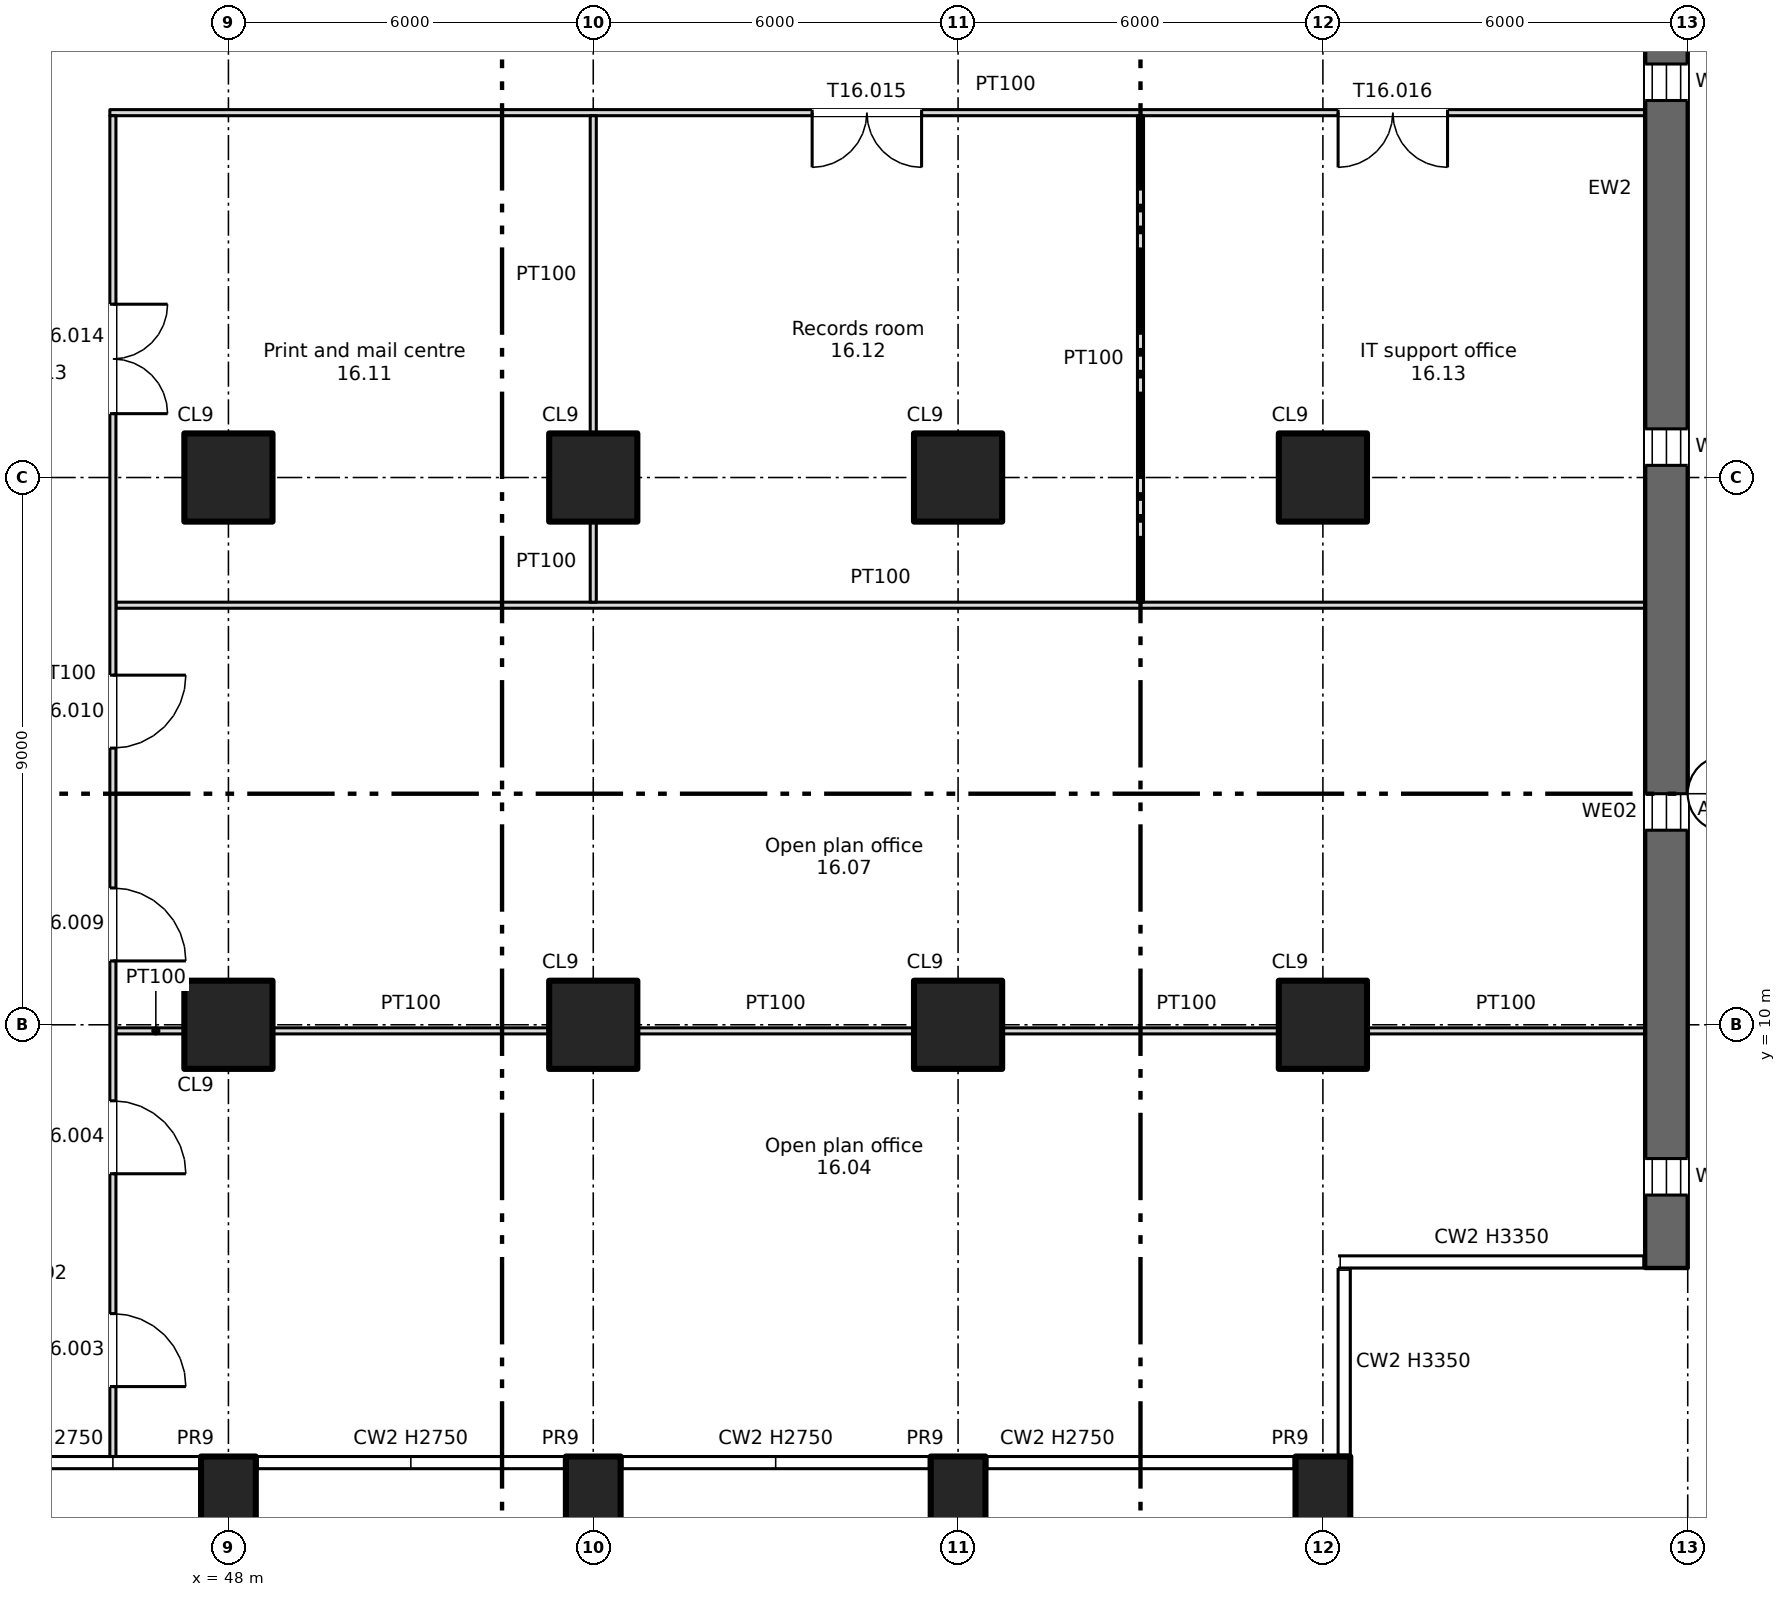
"""IFC4 building model, lengths in metres.
Left out: names, types, materials, properties, quantities, classifications, styles, units other than length and angle.
Written with IfcOpenShell. Run it as: python <this file> out.ifc"""

import sys

from ifc_helpers import new_model, si_unit, direction, frame, frame_2d, origin, origin_2d, place, context, subcontext, project, spatial, rectangle, extrude, element, fill, save


model = new_model("IFC4")
c1 = context("Model", 3, precision=1e-05, world=origin(), true_north=direction((0.0, 1.0)))
c2 = subcontext(c1, "Body", "Model", "MODEL_VIEW")
j1 = project(units=[si_unit("LENGTHUNIT", "METRE"), si_unit("PLANEANGLEUNIT", "RADIAN")], contexts=[c1])
p1 = place(None, origin())
s1 = spatial("IfcSite", under=j1, at=p1, CompositionType="ELEMENT")
p2 = place(p1, origin())
s2 = spatial("IfcBuilding", under=s1, at=p2, CompositionType="ELEMENT")
p3 = place(p2, frame((0.0, 0.0, 98.75)))
s3 = spatial("IfcBuildingStorey", under=s2, at=p3, CompositionType="ELEMENT", Elevation=98.75)
for number, where, z_axis, x_axis in (
    (1, (48.0, 2.2, -0.4), (0.0, 0.0, 1.0), (1.0, 0.0, 0.0)),
    (2, (54.0, 2.2, -0.4), (0.0, 0.0, 1.0), (1.0, 0.0, 0.0)),
    (3, (60.0, 2.2, -0.4), (0.0, 0.0, 1.0), (1.0, 0.0, 0.0)),
    (4, (66.0, 2.2, -0.4), (0.0, 0.0, 1.0), (1.0, 0.0, 0.0)),
):
    element("IfcColumn", number, at=place(p3, frame(where, z_axis=z_axis, x_axis=x_axis)), inside=s3, PredefinedType="COLUMN", context=c2, shape_type="SweptSolid", body=[
        extrude(rectangle(XDim=0.9, YDim=1.4, at=origin_2d()), origin(), (0.0, 0.0, 1.0), 3.75),
    ])
for number, where, z_axis, x_axis in (
    (5, (48.0, 10.0, 0.0), (0.0, 0.0, 1.0), (1.0, 0.0, 0.0)),
    (6, (48.0, 19.0, 0.0), (0.0, 0.0, 1.0), (1.0, 0.0, 0.0)),
    (7, (54.0, 10.0, 0.0), (0.0, 0.0, 1.0), (1.0, 0.0, 0.0)),
    (8, (54.0, 19.0, 0.0), (0.0, 0.0, 1.0), (1.0, 0.0, 0.0)),
    (9, (60.0, 10.0, 0.0), (0.0, 0.0, 1.0), (1.0, 0.0, 0.0)),
    (10, (60.0, 19.0, 0.0), (0.0, 0.0, 1.0), (1.0, 0.0, 0.0)),
    (11, (66.0, 10.0, 0.0), (0.0, 0.0, 1.0), (1.0, 0.0, 0.0)),
    (12, (66.0, 19.0, 0.0), (0.0, 0.0, 1.0), (1.0, 0.0, 0.0)),
):
    element("IfcColumn", number, at=place(p3, frame(where, z_axis=z_axis, x_axis=x_axis)), inside=s3, PredefinedType="COLUMN", context=c2, shape_type="SweptSolid", body=[
        extrude(rectangle(XDim=1.45, YDim=1.45, at=origin_2d()), origin(), (0.0, 0.0, 1.0), 3.35),
    ])
p4 = place(p3, frame((71.65, 6.0, 0.0), z_axis=(0.0, 0.0, 1.0), x_axis=(0.0, 1.0, 0.0)))
e13 = element("IfcWall", 13, at=p4, inside=s3, PredefinedType="SHEAR", context=c2, shape_type="SweptSolid", body=[
    extrude(rectangle(XDim=35.5, YDim=0.7, at=frame_2d((17.75, 0.0))), origin(), (0.0, 0.0, 1.0), 3.35),
])
p5 = place(p4, frame((1.2, 0.0, 0.6)))
e14 = element("IfcOpeningElement", 14, at=p5, cuts=e13, PredefinedType="OPENING", context=c2, shape_type="SweptSolid", body=[
    extrude(rectangle(XDim=0.6, YDim=2.4, at=frame_2d((0.3, 1.2))), frame((0.0, 0.36, 0.0), z_axis=(0.0, -1.0, 0.0), x_axis=(1.0, 0.0, 0.0)), (0.0, 0.0, 1.0), 0.72),
])
p6 = place(p4, frame((7.2, 0.0, 0.6)))
e15 = element("IfcOpeningElement", 15, at=p6, cuts=e13, PredefinedType="OPENING", context=c2, shape_type="SweptSolid", body=[
    extrude(rectangle(XDim=0.6, YDim=2.4, at=frame_2d((0.3, 1.2))), frame((0.0, 0.36, 0.0), z_axis=(0.0, -1.0, 0.0), x_axis=(1.0, 0.0, 0.0)), (0.0, 0.0, 1.0), 0.72),
])
p7 = place(p4, frame((13.2, 0.0, 0.6)))
e16 = element("IfcOpeningElement", 16, at=p7, cuts=e13, PredefinedType="OPENING", context=c2, shape_type="SweptSolid", body=[
    extrude(rectangle(XDim=0.6, YDim=2.4, at=frame_2d((0.3, 1.2))), frame((0.0, 0.36, 0.0), z_axis=(0.0, -1.0, 0.0), x_axis=(1.0, 0.0, 0.0)), (0.0, 0.0, 1.0), 0.72),
])
p8 = place(p4, frame((19.2, 0.0, 0.6)))
e17 = element("IfcOpeningElement", 17, at=p8, cuts=e13, PredefinedType="OPENING", context=c2, shape_type="SweptSolid", body=[
    extrude(rectangle(XDim=0.6, YDim=2.4, at=frame_2d((0.3, 1.2))), frame((0.0, 0.36, 0.0), z_axis=(0.0, -1.0, 0.0), x_axis=(1.0, 0.0, 0.0)), (0.0, 0.0, 1.0), 0.72),
])
p9 = place(p4, frame((25.2, 0.0, 0.6)))
e18 = element("IfcOpeningElement", 18, at=p9, cuts=e13, PredefinedType="OPENING", context=c2, shape_type="SweptSolid", body=[
    extrude(rectangle(XDim=0.6, YDim=2.4, at=frame_2d((0.3, 1.2))), frame((0.0, 0.36, 0.0), z_axis=(0.0, -1.0, 0.0), x_axis=(1.0, 0.0, 0.0)), (0.0, 0.0, 1.0), 0.72),
])
p10 = place(p4, frame((31.2, 0.0, 0.6)))
e19 = element("IfcOpeningElement", 19, at=p10, cuts=e13, PredefinedType="OPENING", context=c2, shape_type="SweptSolid", body=[
    extrude(rectangle(XDim=0.6, YDim=2.4, at=frame_2d((0.3, 1.2))), frame((0.0, 0.36, 0.0), z_axis=(0.0, -1.0, 0.0), x_axis=(1.0, 0.0, 0.0)), (0.0, 0.0, 1.0), 0.72),
])
p11 = place(p3, frame((66.725, 9.9, 0.0), z_axis=(0.0, 0.0, 1.0), x_axis=(1.0, 0.0, 0.0)))
e20 = element("IfcWall", 20, at=p11, inside=s3, PredefinedType="PARTITIONING", context=c2, shape_type="SweptSolid", body=[
    extrude(rectangle(XDim=4.575, YDim=0.1, at=frame_2d((2.288, 0.0))), origin(), (0.0, 0.0, 1.0), 3.35),
])
for number, where, z_axis, x_axis in (
    (21, (60.725, 9.9, 0.0), (0.0, 0.0, 1.0), (1.0, 0.0, 0.0)),
    (22, (54.725, 9.9, 0.0), (0.0, 0.0, 1.0), (1.0, 0.0, 0.0)),
    (23, (48.725, 9.9, 0.0), (0.0, 0.0, 1.0), (1.0, 0.0, 0.0)),
):
    element("IfcWall", number, at=place(p3, frame(where, z_axis=z_axis, x_axis=x_axis)), inside=s3, PredefinedType="PARTITIONING", context=c2, shape_type="SweptSolid", body=[
        extrude(rectangle(XDim=4.55, YDim=0.1, at=frame_2d((2.275, 0.0))), origin(), (0.0, 0.0, 1.0), 3.35),
    ])
p12 = place(p3, frame((46.15, 9.9, 0.0), z_axis=(0.0, 0.0, 1.0), x_axis=(1.0, 0.0, 0.0)))
e24 = element("IfcWall", 24, at=p12, inside=s3, PredefinedType="PARTITIONING", context=c2, shape_type="SweptSolid", body=[
    extrude(rectangle(XDim=1.125, YDim=0.1, at=frame_2d((0.562, 0.0))), origin(), (0.0, 0.0, 1.0), 3.35),
])
p13 = place(p3, frame((46.15, 16.9, 0.0), z_axis=(0.0, 0.0, 1.0), x_axis=(1.0, 0.0, 0.0)))
e25 = element("IfcWall", 25, at=p13, inside=s3, PredefinedType="PARTITIONING", context=c2, shape_type="SweptSolid", body=[
    extrude(rectangle(XDim=25.15, YDim=0.1, at=frame_2d((12.575, 0.0))), origin(), (0.0, 0.0, 1.0), 3.35),
])
p14 = place(p3, frame((46.05, 25.0, 0.0), z_axis=(0.0, 0.0, 1.0), x_axis=(1.0, 0.0, 0.0)))
e26 = element("IfcWall", 26, at=p14, inside=s3, PredefinedType="PARTITIONING", context=c2, shape_type="SweptSolid", body=[
    extrude(rectangle(XDim=25.25, YDim=0.1, at=frame_2d((12.625, 0.0))), origin(), (0.0, 0.0, 1.0), 3.35),
])
p15 = place(p14, frame((11.55, 0.0, 0.0)))
e27 = element("IfcOpeningElement", 27, at=p15, cuts=e26, PredefinedType="OPENING", context=c2, shape_type="SweptSolid", body=[
    extrude(rectangle(XDim=1.8, YDim=2.1, at=frame_2d((0.9, 1.05))), frame((0.0, 0.06, 0.0), z_axis=(0.0, -1.0, 0.0), x_axis=(1.0, 0.0, 0.0)), (0.0, 0.0, 1.0), 0.12),
])
p16 = place(p14, frame((20.2, 0.0, 0.0)))
e28 = element("IfcOpeningElement", 28, at=p16, cuts=e26, PredefinedType="OPENING", context=c2, shape_type="SweptSolid", body=[
    extrude(rectangle(XDim=1.8, YDim=2.1, at=frame_2d((0.9, 1.05))), frame((0.0, 0.06, 0.0), z_axis=(0.0, -1.0, 0.0), x_axis=(1.0, 0.0, 0.0)), (0.0, 0.0, 1.0), 0.12),
])
p17 = place(p3, frame((46.1, 2.9, 0.0), z_axis=(0.0, 0.0, 1.0), x_axis=(0.0, 1.0, 0.0)))
e29 = element("IfcWall", 29, at=p17, inside=s3, PredefinedType="PARTITIONING", context=c2, shape_type="SweptSolid", body=[
    extrude(rectangle(XDim=22.05, YDim=0.1, at=frame_2d((11.025, 0.0))), origin(), (0.0, 0.0, 1.0), 3.35),
])
p18 = place(p17, frame((1.15, 0.0, 0.0)))
e30 = element("IfcOpeningElement", 30, at=p18, cuts=e29, PredefinedType="OPENING", context=c2, shape_type="SweptSolid", body=[
    extrude(rectangle(XDim=1.2, YDim=2.1, at=frame_2d((0.6, 1.05))), frame((0.0, 0.06, 0.0), z_axis=(0.0, -1.0, 0.0), x_axis=(1.0, 0.0, 0.0)), (0.0, 0.0, 1.0), 0.12),
])
p19 = place(p17, frame((4.65, 0.0, 0.0)))
e31 = element("IfcOpeningElement", 31, at=p19, cuts=e29, PredefinedType="OPENING", context=c2, shape_type="SweptSolid", body=[
    extrude(rectangle(XDim=1.2, YDim=2.1, at=frame_2d((0.6, 1.05))), frame((0.0, 0.06, 0.0), z_axis=(0.0, -1.0, 0.0), x_axis=(1.0, 0.0, 0.0)), (0.0, 0.0, 1.0), 0.12),
])
p20 = place(p17, frame((8.15, 0.0, 0.0)))
e32 = element("IfcOpeningElement", 32, at=p20, cuts=e29, PredefinedType="OPENING", context=c2, shape_type="SweptSolid", body=[
    extrude(rectangle(XDim=1.2, YDim=2.1, at=frame_2d((0.6, 1.05))), frame((0.0, 0.06, 0.0), z_axis=(0.0, -1.0, 0.0), x_axis=(1.0, 0.0, 0.0)), (0.0, 0.0, 1.0), 0.12),
])
p21 = place(p17, frame((11.65, 0.0, 0.0)))
e33 = element("IfcOpeningElement", 33, at=p21, cuts=e29, PredefinedType="OPENING", context=c2, shape_type="SweptSolid", body=[
    extrude(rectangle(XDim=1.2, YDim=2.1, at=frame_2d((0.6, 1.05))), frame((0.0, 0.06, 0.0), z_axis=(0.0, -1.0, 0.0), x_axis=(1.0, 0.0, 0.0)), (0.0, 0.0, 1.0), 0.12),
])
p22 = place(p17, frame((17.15, 0.0, 0.0)))
e34 = element("IfcOpeningElement", 34, at=p22, cuts=e29, PredefinedType="OPENING", context=c2, shape_type="SweptSolid", body=[
    extrude(rectangle(XDim=1.8, YDim=2.1, at=frame_2d((0.9, 1.05))), frame((0.0, 0.06, 0.0), z_axis=(0.0, -1.0, 0.0), x_axis=(1.0, 0.0, 0.0)), (0.0, 0.0, 1.0), 0.12),
])
p23 = place(p3, frame((54.0, 16.95, 0.0), z_axis=(0.0, 0.0, 1.0), x_axis=(0.0, 1.0, 0.0)))
e35 = element("IfcWall", 35, at=p23, inside=s3, PredefinedType="PARTITIONING", context=c2, shape_type="SweptSolid", body=[
    extrude(rectangle(XDim=1.325, YDim=0.1, at=frame_2d((0.663, 0.0))), origin(), (0.0, 0.0, 1.0), 3.35),
])
p24 = place(p3, frame((54.0, 19.725, 0.0), z_axis=(0.0, 0.0, 1.0), x_axis=(0.0, 1.0, 0.0)))
e36 = element("IfcWall", 36, at=p24, inside=s3, PredefinedType="PARTITIONING", context=c2, shape_type="SweptSolid", body=[
    extrude(rectangle(XDim=5.225, YDim=0.1, at=frame_2d((2.612, 0.0))), origin(), (0.0, 0.0, 1.0), 3.35),
])
p25 = place(p3, frame((63.0, 16.95, 0.0), z_axis=(0.0, 0.0, 1.0), x_axis=(0.0, 1.0, 0.0)))
e37 = element("IfcWall", 37, at=p25, inside=s3, PredefinedType="PARTITIONING", context=c2, shape_type="SweptSolid", body=[
    extrude(rectangle(XDim=8.0, YDim=0.1, at=frame_2d((4.0, 0.0))), origin(), (0.0, 0.0, 1.0), 3.35),
])
p26 = place(p5, origin())
e38 = element("IfcWindow", 38, at=p26, inside=s3, PartitioningType="SINGLE_PANEL", PredefinedType="WINDOW", context=c2, shape_type="SweptSolid", body=[
    extrude(rectangle(XDim=0.6, YDim=2.4, at=frame_2d((0.3, 1.2))), frame((0.0, 0.03, 0.0), z_axis=(0.0, -1.0, 0.0), x_axis=(1.0, 0.0, 0.0)), (0.0, 0.0, 1.0), 0.06),
])
fill(e14, e38)
p27 = place(p6, origin())
e39 = element("IfcWindow", 39, at=p27, inside=s3, PartitioningType="SINGLE_PANEL", PredefinedType="WINDOW", context=c2, shape_type="SweptSolid", body=[
    extrude(rectangle(XDim=0.6, YDim=2.4, at=frame_2d((0.3, 1.2))), frame((0.0, 0.03, 0.0), z_axis=(0.0, -1.0, 0.0), x_axis=(1.0, 0.0, 0.0)), (0.0, 0.0, 1.0), 0.06),
])
fill(e15, e39)
p28 = place(p7, origin())
e40 = element("IfcWindow", 40, at=p28, inside=s3, PartitioningType="SINGLE_PANEL", PredefinedType="WINDOW", context=c2, shape_type="SweptSolid", body=[
    extrude(rectangle(XDim=0.6, YDim=2.4, at=frame_2d((0.3, 1.2))), frame((0.0, 0.03, 0.0), z_axis=(0.0, -1.0, 0.0), x_axis=(1.0, 0.0, 0.0)), (0.0, 0.0, 1.0), 0.06),
])
fill(e16, e40)
p29 = place(p8, origin())
e41 = element("IfcWindow", 41, at=p29, inside=s3, PartitioningType="SINGLE_PANEL", PredefinedType="WINDOW", context=c2, shape_type="SweptSolid", body=[
    extrude(rectangle(XDim=0.6, YDim=2.4, at=frame_2d((0.3, 1.2))), frame((0.0, 0.03, 0.0), z_axis=(0.0, -1.0, 0.0), x_axis=(1.0, 0.0, 0.0)), (0.0, 0.0, 1.0), 0.06),
])
fill(e17, e41)
p30 = place(p18, origin())
e42 = element("IfcDoor", 42, at=p30, inside=s3, OperationType="SINGLE_SWING_LEFT", PredefinedType="DOOR", context=c2, shape_type="SweptSolid", body=[
    extrude(rectangle(XDim=1.2, YDim=2.1, at=frame_2d((0.6, 1.05))), frame((0.0, 0.025, 0.0), z_axis=(0.0, -1.0, 0.0), x_axis=(1.0, 0.0, 0.0)), (0.0, 0.0, 1.0), 0.05),
])
fill(e30, e42)
p31 = place(p19, origin())
e43 = element("IfcDoor", 43, at=p31, inside=s3, OperationType="SINGLE_SWING_LEFT", PredefinedType="DOOR", context=c2, shape_type="SweptSolid", body=[
    extrude(rectangle(XDim=1.2, YDim=2.1, at=frame_2d((0.6, 1.05))), frame((0.0, 0.025, 0.0), z_axis=(0.0, -1.0, 0.0), x_axis=(1.0, 0.0, 0.0)), (0.0, 0.0, 1.0), 0.05),
])
fill(e31, e43)
p32 = place(p20, origin())
e44 = element("IfcDoor", 44, at=p32, inside=s3, OperationType="SINGLE_SWING_LEFT", PredefinedType="DOOR", context=c2, shape_type="SweptSolid", body=[
    extrude(rectangle(XDim=1.2, YDim=2.1, at=frame_2d((0.6, 1.05))), frame((0.0, 0.025, 0.0), z_axis=(0.0, -1.0, 0.0), x_axis=(1.0, 0.0, 0.0)), (0.0, 0.0, 1.0), 0.05),
])
fill(e32, e44)
p33 = place(p21, origin())
e45 = element("IfcDoor", 45, at=p33, inside=s3, OperationType="SINGLE_SWING_RIGHT", PredefinedType="DOOR", context=c2, shape_type="SweptSolid", body=[
    extrude(rectangle(XDim=1.2, YDim=2.1, at=frame_2d((0.6, 1.05))), frame((0.0, 0.025, 0.0), z_axis=(0.0, -1.0, 0.0), x_axis=(1.0, 0.0, 0.0)), (0.0, 0.0, 1.0), 0.05),
])
fill(e33, e45)
p34 = place(p22, origin())
e46 = element("IfcDoor", 46, at=p34, inside=s3, OperationType="DOUBLE_DOOR_SINGLE_SWING", PredefinedType="DOOR", context=c2, shape_type="SweptSolid", body=[
    extrude(rectangle(XDim=1.8, YDim=2.1, at=frame_2d((0.9, 1.05))), frame((0.0, 0.025, 0.0), z_axis=(0.0, -1.0, 0.0), x_axis=(1.0, 0.0, 0.0)), (0.0, 0.0, 1.0), 0.05),
])
fill(e34, e46)
p35 = place(p15, origin())
e47 = element("IfcDoor", 47, at=p35, inside=s3, OperationType="DOUBLE_DOOR_SINGLE_SWING", PredefinedType="DOOR", context=c2, shape_type="SweptSolid", body=[
    extrude(rectangle(XDim=1.8, YDim=2.1, at=frame_2d((0.9, 1.05))), frame((0.0, 0.025, 0.0), z_axis=(0.0, -1.0, 0.0), x_axis=(1.0, 0.0, 0.0)), (0.0, 0.0, 1.0), 0.05),
])
fill(e27, e47)
p36 = place(p16, origin())
e48 = element("IfcDoor", 48, at=p36, inside=s3, OperationType="DOUBLE_DOOR_SINGLE_SWING", PredefinedType="DOOR", context=c2, shape_type="SweptSolid", body=[
    extrude(rectangle(XDim=1.8, YDim=2.1, at=frame_2d((0.9, 1.05))), frame((0.0, 0.025, 0.0), z_axis=(0.0, -1.0, 0.0), x_axis=(1.0, 0.0, 0.0)), (0.0, 0.0, 1.0), 0.05),
])
fill(e28, e48)
save(model, sys.argv[1])
